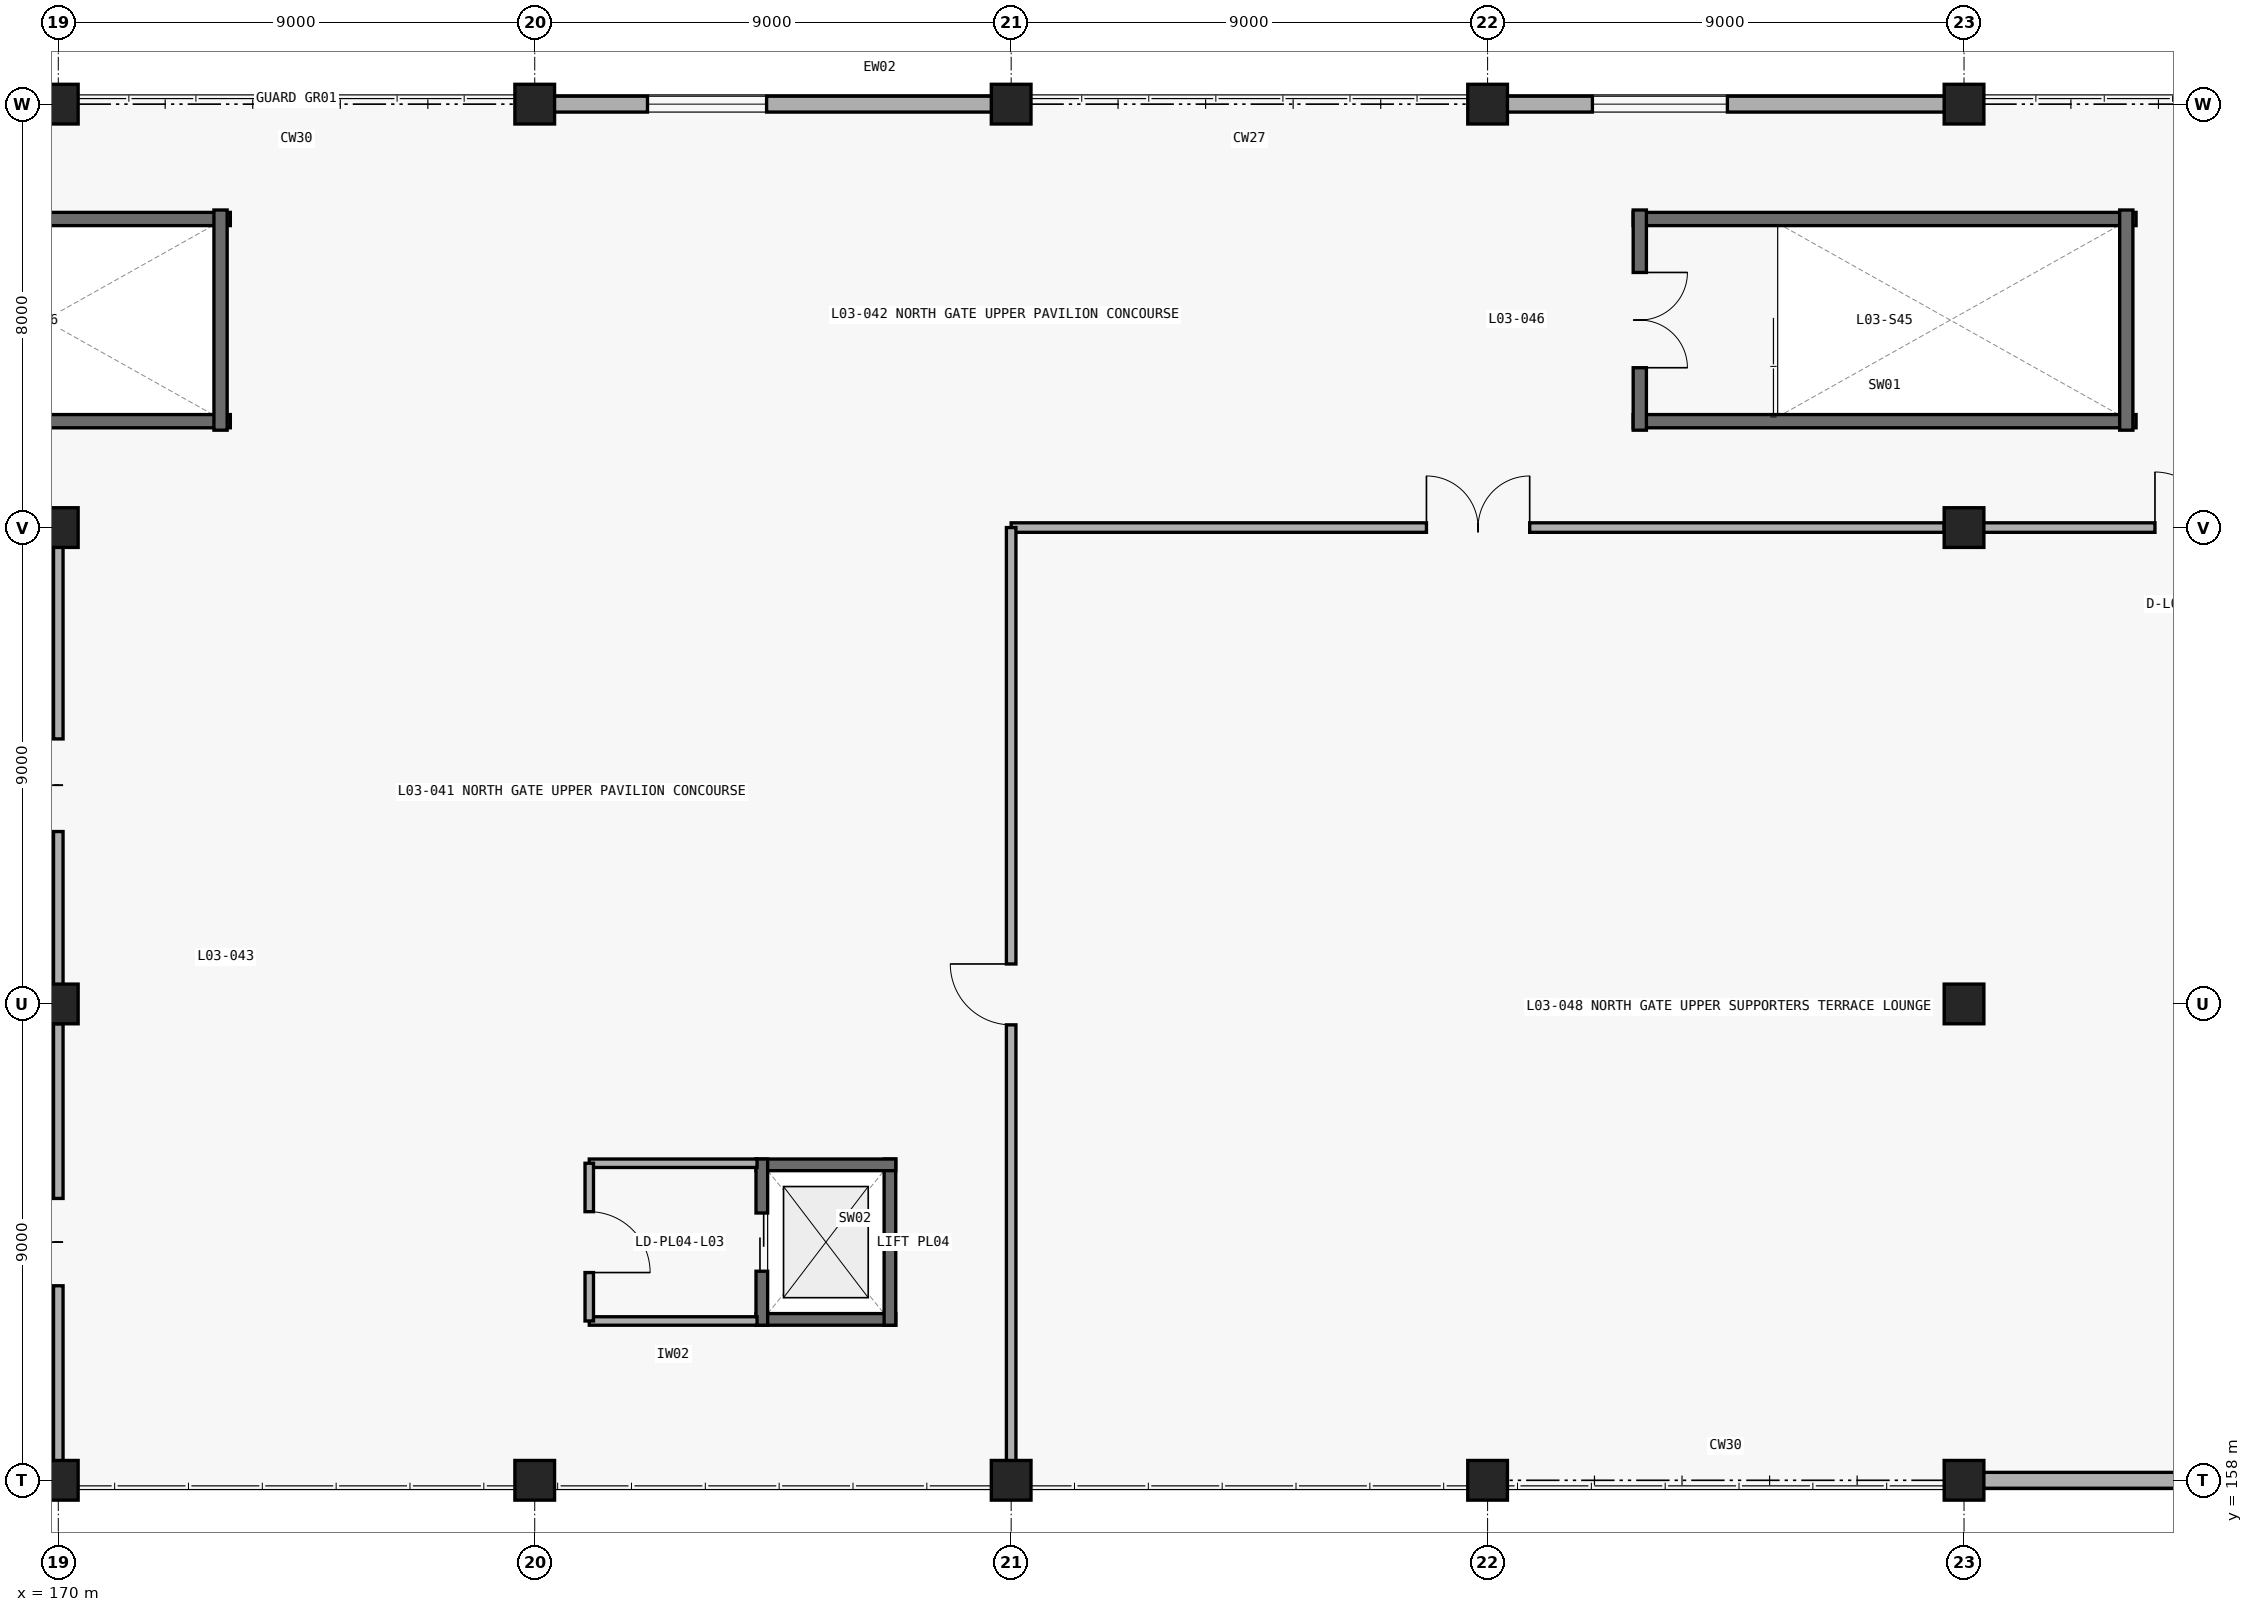
"""IFC4 building model, lengths in metres.
Left out: names, types, materials, properties, quantities, classifications, styles, units other than length and angle.
Written with IfcOpenShell. Run it as: python <this file> out.ifc"""

import sys

from ifc_helpers import new_model, si_unit, direction, frame, frame_2d, origin, origin_2d, place, context, subcontext, project, spatial, rectangle, extrude, element, fill, save


model = new_model("IFC4")
c1 = context("Model", 3, precision=1e-05, world=origin(), true_north=direction((0.0, 1.0)))
c2 = subcontext(c1, "Body", "Model", "MODEL_VIEW")
j1 = project(units=[si_unit("LENGTHUNIT", "METRE"), si_unit("PLANEANGLEUNIT", "RADIAN")], contexts=[c1])
p1 = place(None, origin())
s1 = spatial("IfcSite", under=j1, at=p1, CompositionType="ELEMENT")
p2 = place(p1, origin())
s2 = spatial("IfcBuilding", under=s1, at=p2, CompositionType="ELEMENT")
p3 = place(p2, frame((0.0, 0.0, 15.0)))
s3 = spatial("IfcBuildingStorey", under=s2, at=p3, CompositionType="ELEMENT", Elevation=15.0)
for number, where, z_axis, x_axis in (
    (1, (170.0, 158.0, 0.0), (0.0, 0.0, 1.0), (1.0, 0.0, 0.0)),
    (2, (170.0, 167.0, 0.0), (0.0, 0.0, 1.0), (1.0, 0.0, 0.0)),
    (3, (170.0, 176.0, 0.0), (0.0, 0.0, 1.0), (1.0, 0.0, 0.0)),
    (4, (170.0, 184.0, 0.0), (0.0, 0.0, 1.0), (1.0, 0.0, 0.0)),
    (5, (179.0, 158.0, 0.0), (0.0, 0.0, 1.0), (1.0, 0.0, 0.0)),
    (6, (179.0, 184.0, 0.0), (0.0, 0.0, 1.0), (1.0, 0.0, 0.0)),
    (7, (188.0, 158.0, 0.0), (0.0, 0.0, 1.0), (1.0, 0.0, 0.0)),
    (8, (188.0, 184.0, 0.0), (0.0, 0.0, 1.0), (1.0, 0.0, 0.0)),
    (9, (197.0, 158.0, 0.0), (0.0, 0.0, 1.0), (1.0, 0.0, 0.0)),
    (10, (197.0, 184.0, 0.0), (0.0, 0.0, 1.0), (1.0, 0.0, 0.0)),
    (11, (206.0, 158.0, 0.0), (0.0, 0.0, 1.0), (1.0, 0.0, 0.0)),
    (12, (206.0, 167.0, 0.0), (0.0, 0.0, 1.0), (1.0, 0.0, 0.0)),
    (13, (206.0, 176.0, 0.0), (0.0, 0.0, 1.0), (1.0, 0.0, 0.0)),
    (14, (206.0, 184.0, 0.0), (0.0, 0.0, 1.0), (1.0, 0.0, 0.0)),
):
    element("IfcColumn", number, at=place(p3, frame(where, z_axis=z_axis, x_axis=x_axis)), inside=s3, PredefinedType="COLUMN", context=c2, shape_type="SweptSolid", body=[
        extrude(rectangle(XDim=0.75, YDim=0.75, at=origin_2d()), origin(), (0.0, 0.0, 1.0), 4.8),
    ])
p4 = place(p3, frame((179.35, 184.0, 0.0), z_axis=(0.0, 0.0, 1.0), x_axis=(1.0, 0.0, 0.0)))
e15 = element("IfcWall", 15, at=p4, inside=s3, PredefinedType="STANDARD", context=c2, shape_type="SweptSolid", body=[
    extrude(rectangle(XDim=8.3, YDim=0.3, at=frame_2d((4.15, 0.0))), origin(), (0.0, 0.0, 1.0), 3.823),
])
p5 = place(p4, frame((1.78, 0.0, 0.95)))
e16 = element("IfcOpeningElement", 16, at=p5, cuts=e15, PredefinedType="OPENING", context=c2, shape_type="SweptSolid", body=[
    extrude(rectangle(XDim=2.25, YDim=2.15, at=frame_2d((1.125, 1.075))), frame((0.0, 0.16, 0.0), z_axis=(0.0, -1.0, 0.0), x_axis=(1.0, 0.0, 0.0)), (0.0, 0.0, 1.0), 0.32),
])
p6 = place(p3, frame((197.35, 184.0, 0.0), z_axis=(0.0, 0.0, 1.0), x_axis=(1.0, 0.0, 0.0)))
e17 = element("IfcWall", 17, at=p6, inside=s3, PredefinedType="STANDARD", context=c2, shape_type="SweptSolid", body=[
    extrude(rectangle(XDim=8.3, YDim=0.3, at=frame_2d((4.15, 0.0))), origin(), (0.0, 0.0, 1.0), 3.823),
])
p7 = place(p6, frame((1.63, 0.0, 0.95)))
e18 = element("IfcOpeningElement", 18, at=p7, cuts=e17, PredefinedType="OPENING", context=c2, shape_type="SweptSolid", body=[
    extrude(rectangle(XDim=2.55, YDim=2.2, at=frame_2d((1.275, 1.1))), frame((0.0, 0.16, 0.0), z_axis=(0.0, -1.0, 0.0), x_axis=(1.0, 0.0, 0.0)), (0.0, 0.0, 1.0), 0.32),
])
p8 = place(p3, frame((214.65, 158.0, 0.0), z_axis=(0.0, 0.0, 1.0), x_axis=(-1.0, 0.0, 0.0)))
e19 = element("IfcWall", 19, at=p8, inside=s3, PredefinedType="STANDARD", context=c2, shape_type="SweptSolid", body=[
    extrude(rectangle(XDim=8.3, YDim=0.3, at=frame_2d((4.15, 0.0))), origin(), (0.0, 0.0, 1.0), 3.823),
])
p9 = place(p8, frame((2.18, 0.0, 0.95)))
e20 = element("IfcOpeningElement", 20, at=p9, cuts=e19, PredefinedType="OPENING", context=c2, shape_type="SweptSolid", body=[
    extrude(rectangle(XDim=1.45, YDim=1.85, at=frame_2d((0.725, 0.925))), frame((0.0, 0.16, 0.0), z_axis=(0.0, -1.0, 0.0), x_axis=(1.0, 0.0, 0.0)), (0.0, 0.0, 1.0), 0.32),
])
for number, where, z_axis, x_axis in (
    (21, (199.75, 178.01, 0.0), (0.0, 0.0, 1.0), (1.0, 0.0, 0.0)),
    (22, (209.25, 181.83, 0.0), (0.0, 0.0, 1.0), (-1.0, 0.0, 0.0)),
):
    element("IfcWall", number, at=place(p3, frame(where, z_axis=z_axis, x_axis=x_axis)), inside=s3, PredefinedType="SHEAR", context=c2, shape_type="SweptSolid", body=[
        extrude(rectangle(XDim=9.5, YDim=0.25, at=frame_2d((4.75, 0.0))), origin(), (0.0, 0.0, 1.0), 4.54),
    ])
p10 = place(p3, frame((199.875, 182.0, 0.0), z_axis=(0.0, 0.0, 1.0), x_axis=(0.0, -1.0, 0.0)))
e23 = element("IfcWall", 23, at=p10, inside=s3, PredefinedType="SHEAR", context=c2, shape_type="SweptSolid", body=[
    extrude(rectangle(XDim=4.16, YDim=0.25, at=frame_2d((2.08, 0.0))), origin(), (0.0, 0.0, 1.0), 4.54),
])
p11 = place(p10, frame((1.18, 0.0, 0.0)))
e24 = element("IfcOpeningElement", 24, at=p11, cuts=e23, PredefinedType="OPENING", context=c2, shape_type="SweptSolid", body=[
    extrude(rectangle(XDim=1.8, YDim=2.25, at=frame_2d((0.9, 1.125))), frame((0.0, 0.135, 0.0), z_axis=(0.0, -1.0, 0.0), x_axis=(1.0, 0.0, 0.0)), (0.0, 0.0, 1.0), 0.27),
])
p12 = place(p3, frame((209.065, 177.84, 0.0), z_axis=(0.0, 0.0, 1.0), x_axis=(0.0, 1.0, 0.0)))
e25 = element("IfcWall", 25, at=p12, inside=s3, PredefinedType="SHEAR", context=c2, shape_type="SweptSolid", body=[
    extrude(rectangle(XDim=4.16, YDim=0.25, at=frame_2d((2.08, 0.0))), origin(), (0.0, 0.0, 1.0), 4.54),
])
for number, where, z_axis, x_axis in (
    (26, (163.75, 178.01, 0.0), (0.0, 0.0, 1.0), (1.0, 0.0, 0.0)),
    (27, (173.25, 181.83, 0.0), (0.0, 0.0, 1.0), (-1.0, 0.0, 0.0)),
):
    element("IfcWall", number, at=place(p3, frame(where, z_axis=z_axis, x_axis=x_axis)), inside=s3, PredefinedType="SHEAR", context=c2, shape_type="SweptSolid", body=[
        extrude(rectangle(XDim=9.5, YDim=0.25, at=frame_2d((4.75, 0.0))), origin(), (0.0, 0.0, 1.0), 4.54),
    ])
p13 = place(p3, frame((173.065, 177.84, 0.0), z_axis=(0.0, 0.0, 1.0), x_axis=(0.0, 1.0, 0.0)))
e28 = element("IfcWall", 28, at=p13, inside=s3, PredefinedType="SHEAR", context=c2, shape_type="SweptSolid", body=[
    extrude(rectangle(XDim=4.16, YDim=0.25, at=frame_2d((2.08, 0.0))), origin(), (0.0, 0.0, 1.0), 4.54),
])
p14 = place(p3, frame((183.18, 161.04, 0.0), z_axis=(0.0, 0.0, 1.0), x_axis=(1.0, 0.0, 0.0)))
e29 = element("IfcWall", 29, at=p14, inside=s3, PredefinedType="SHEAR", context=c2, shape_type="SweptSolid", body=[
    extrude(rectangle(XDim=2.64, YDim=0.22, at=frame_2d((1.32, 0.0))), origin(), (0.0, 0.0, 1.0), 4.54),
])
p15 = place(p3, frame((185.71, 160.93, 0.0), z_axis=(0.0, 0.0, 1.0), x_axis=(0.0, 1.0, 0.0)))
e30 = element("IfcWall", 30, at=p15, inside=s3, PredefinedType="SHEAR", context=c2, shape_type="SweptSolid", body=[
    extrude(rectangle(XDim=3.14, YDim=0.22, at=frame_2d((1.57, 0.0))), origin(), (0.0, 0.0, 1.0), 4.54),
])
p16 = place(p3, frame((185.82, 163.96, 0.0), z_axis=(0.0, 0.0, 1.0), x_axis=(-1.0, 0.0, 0.0)))
e31 = element("IfcWall", 31, at=p16, inside=s3, PredefinedType="SHEAR", context=c2, shape_type="SweptSolid", body=[
    extrude(rectangle(XDim=2.64, YDim=0.22, at=frame_2d((1.32, 0.0))), origin(), (0.0, 0.0, 1.0), 4.54),
])
p17 = place(p3, frame((183.29, 164.07, 0.0), z_axis=(0.0, 0.0, 1.0), x_axis=(0.0, -1.0, 0.0)))
e32 = element("IfcWall", 32, at=p17, inside=s3, PredefinedType="SHEAR", context=c2, shape_type="SweptSolid", body=[
    extrude(rectangle(XDim=3.14, YDim=0.22, at=frame_2d((1.57, 0.0))), origin(), (0.0, 0.0, 1.0), 4.54),
])
p18 = place(p17, frame((1.02, 0.0, 0.0)))
e33 = element("IfcOpeningElement", 33, at=p18, cuts=e32, PredefinedType="OPENING", context=c2, shape_type="SweptSolid", body=[
    extrude(rectangle(XDim=1.1, YDim=2.15, at=frame_2d((0.55, 1.075))), frame((0.0, 0.12, 0.0), z_axis=(0.0, -1.0, 0.0), x_axis=(1.0, 0.0, 0.0)), (0.0, 0.0, 1.0), 0.24),
])
for number, where, z_axis, x_axis in (
    (34, (183.2, 163.99, 0.0), (0.0, 0.0, 1.0), (-1.0, 0.0, 0.0)),
    (35, (183.2, 161.01, 0.0), (0.0, 0.0, 1.0), (-1.0, 0.0, 0.0)),
):
    element("IfcWall", number, at=place(p3, frame(where, z_axis=z_axis, x_axis=x_axis)), inside=s3, PredefinedType="PARTITIONING", context=c2, shape_type="SweptSolid", body=[
        extrude(rectangle(XDim=3.17, YDim=0.16, at=frame_2d((1.585, 0.0))), origin(), (0.0, 0.0, 1.0), 4.52),
    ])
p19 = place(p3, frame((180.03, 163.99, 0.0), z_axis=(0.0, 0.0, 1.0), x_axis=(0.0, -1.0, 0.0)))
e36 = element("IfcWall", 36, at=p19, inside=s3, PredefinedType="PARTITIONING", context=c2, shape_type="SweptSolid", body=[
    extrude(rectangle(XDim=2.98, YDim=0.16, at=frame_2d((1.49, 0.0))), origin(), (0.0, 0.0, 1.0), 4.52),
])
p20 = place(p19, frame((0.915, 0.0, 0.0)))
e37 = element("IfcOpeningElement", 37, at=p20, cuts=e36, PredefinedType="OPENING", context=c2, shape_type="SweptSolid", body=[
    extrude(rectangle(XDim=1.15, YDim=2.2, at=frame_2d((0.575, 1.1))), frame((0.0, 0.09, 0.0), z_axis=(0.0, -1.0, 0.0), x_axis=(1.0, 0.0, 0.0)), (0.0, 0.0, 1.0), 0.18),
])
p21 = place(p3, frame((170.0, 158.36, 0.0), z_axis=(0.0, 0.0, 1.0), x_axis=(0.0, 1.0, 0.0)))
e38 = element("IfcWall", 38, at=p21, inside=s3, PredefinedType="PARTITIONING", context=c2, shape_type="SweptSolid", body=[
    extrude(rectangle(XDim=8.28, YDim=0.18, at=frame_2d((4.14, 0.0))), origin(), (0.0, 0.0, 1.0), 3.857),
])
p22 = place(p21, frame((3.315, 0.0, 0.0)))
e39 = element("IfcOpeningElement", 39, at=p22, cuts=e38, PredefinedType="OPENING", context=c2, shape_type="SweptSolid", body=[
    extrude(rectangle(XDim=1.65, YDim=2.25, at=frame_2d((0.825, 1.125))), frame((0.0, 0.1, 0.0), z_axis=(0.0, -1.0, 0.0), x_axis=(1.0, 0.0, 0.0)), (0.0, 0.0, 1.0), 0.2),
])
p23 = place(p3, frame((170.0, 166.625, 0.0), z_axis=(0.0, 0.0, 1.0), x_axis=(0.0, 1.0, 0.0)))
e40 = element("IfcWall", 40, at=p23, inside=s3, PredefinedType="PARTITIONING", context=c2, shape_type="SweptSolid", body=[
    extrude(rectangle(XDim=9.015, YDim=0.18, at=frame_2d((4.507, 0.0))), origin(), (0.0, 0.0, 1.0), 3.857),
])
p24 = place(p23, frame((3.632, 0.0, 0.0)))
e41 = element("IfcOpeningElement", 41, at=p24, cuts=e40, PredefinedType="OPENING", context=c2, shape_type="SweptSolid", body=[
    extrude(rectangle(XDim=1.75, YDim=2.3, at=frame_2d((0.875, 1.15))), frame((0.0, 0.1, 0.0), z_axis=(0.0, -1.0, 0.0), x_axis=(1.0, 0.0, 0.0)), (0.0, 0.0, 1.0), 0.2),
])
p25 = place(p3, frame((188.0, 176.0, 0.0), z_axis=(0.0, 0.0, 1.0), x_axis=(1.0, 0.0, 0.0)))
e42 = element("IfcWall", 42, at=p25, inside=s3, PredefinedType="PARTITIONING", context=c2, shape_type="SweptSolid", body=[
    extrude(rectangle(XDim=17.64, YDim=0.18, at=frame_2d((8.82, 0.0))), origin(), (0.0, 0.0, 1.0), 4.52),
])
p26 = place(p25, frame((7.845, 0.0, 0.0)))
e43 = element("IfcOpeningElement", 43, at=p26, cuts=e42, PredefinedType="OPENING", context=c2, shape_type="SweptSolid", body=[
    extrude(rectangle(XDim=1.95, YDim=2.35, at=frame_2d((0.975, 1.175))), frame((0.0, 0.1, 0.0), z_axis=(0.0, -1.0, 0.0), x_axis=(1.0, 0.0, 0.0)), (0.0, 0.0, 1.0), 0.2),
])
p27 = place(p3, frame((205.625, 176.0, 0.0), z_axis=(0.0, 0.0, 1.0), x_axis=(1.0, 0.0, 0.0)))
e44 = element("IfcWall", 44, at=p27, inside=s3, PredefinedType="PARTITIONING", context=c2, shape_type="SweptSolid", body=[
    extrude(rectangle(XDim=9.015, YDim=0.18, at=frame_2d((4.507, 0.0))), origin(), (0.0, 0.0, 1.0), 3.823),
])
p28 = place(p27, frame((3.982, 0.0, 0.0)))
e45 = element("IfcOpeningElement", 45, at=p28, cuts=e44, PredefinedType="OPENING", context=c2, shape_type="SweptSolid", body=[
    extrude(rectangle(XDim=1.05, YDim=2.15, at=frame_2d((0.525, 1.075))), frame((0.0, 0.1, 0.0), z_axis=(0.0, -1.0, 0.0), x_axis=(1.0, 0.0, 0.0)), (0.0, 0.0, 1.0), 0.2),
])
p29 = place(p3, frame((188.0, 158.36, 0.0), z_axis=(0.0, 0.0, 1.0), x_axis=(0.0, 1.0, 0.0)))
e46 = element("IfcWall", 46, at=p29, inside=s3, PredefinedType="PARTITIONING", context=c2, shape_type="SweptSolid", body=[
    extrude(rectangle(XDim=17.64, YDim=0.18, at=frame_2d((8.82, 0.0))), origin(), (0.0, 0.0, 1.0), 4.52),
])
p30 = place(p29, frame((8.245, 0.0, 0.0)))
e47 = element("IfcOpeningElement", 47, at=p30, cuts=e46, PredefinedType="OPENING", context=c2, shape_type="SweptSolid", body=[
    extrude(rectangle(XDim=1.15, YDim=2.2, at=frame_2d((0.575, 1.1))), frame((0.0, 0.1, 0.0), z_axis=(0.0, -1.0, 0.0), x_axis=(1.0, 0.0, 0.0)), (0.0, 0.0, 1.0), 0.2),
])
p31 = place(p5, origin())
e48 = element("IfcWindow", 48, at=p31, inside=s3, PartitioningType="SINGLE_PANEL", PredefinedType="WINDOW", context=c2, shape_type="SweptSolid", body=[
    extrude(rectangle(XDim=2.25, YDim=2.15, at=frame_2d((1.125, 1.075))), frame((0.0, 0.03, 0.0), z_axis=(0.0, -1.0, 0.0), x_axis=(1.0, 0.0, 0.0)), (0.0, 0.0, 1.0), 0.06),
])
fill(e16, e48)
p32 = place(p7, origin())
e49 = element("IfcWindow", 49, at=p32, inside=s3, PartitioningType="SINGLE_PANEL", PredefinedType="WINDOW", context=c2, shape_type="SweptSolid", body=[
    extrude(rectangle(XDim=2.55, YDim=2.2, at=frame_2d((1.275, 1.1))), frame((0.0, 0.03, 0.0), z_axis=(0.0, -1.0, 0.0), x_axis=(1.0, 0.0, 0.0)), (0.0, 0.0, 1.0), 0.06),
])
fill(e18, e49)
p33 = place(p11, origin())
e50 = element("IfcDoor", 50, at=p33, inside=s3, OperationType="DOUBLE_DOOR_SINGLE_SWING", PredefinedType="DOOR", context=c2, shape_type="SweptSolid", body=[
    extrude(rectangle(XDim=1.8, YDim=2.25, at=frame_2d((0.9, 1.125))), frame((0.0, 0.025, 0.0), z_axis=(0.0, -1.0, 0.0), x_axis=(1.0, 0.0, 0.0)), (0.0, 0.0, 1.0), 0.05),
])
fill(e24, e50)
p34 = place(p18, origin())
e51 = element("IfcDoor", 51, at=p34, inside=s3, OperationType="SLIDING_TO_LEFT", PredefinedType="DOOR", context=c2, shape_type="SweptSolid", body=[
    extrude(rectangle(XDim=1.1, YDim=2.15, at=frame_2d((0.55, 1.075))), frame((0.0, 0.025, 0.0), z_axis=(0.0, -1.0, 0.0), x_axis=(1.0, 0.0, 0.0)), (0.0, 0.0, 1.0), 0.05),
])
fill(e33, e51)
p35 = place(p20, origin())
e52 = element("IfcDoor", 52, at=p35, inside=s3, OperationType="SINGLE_SWING_RIGHT", PredefinedType="DOOR", context=c2, shape_type="SweptSolid", body=[
    extrude(rectangle(XDim=1.15, YDim=2.2, at=frame_2d((0.575, 1.1))), frame((0.0, 0.025, 0.0), z_axis=(0.0, -1.0, 0.0), x_axis=(1.0, 0.0, 0.0)), (0.0, 0.0, 1.0), 0.05),
])
fill(e37, e52)
p36 = place(p22, origin())
e53 = element("IfcDoor", 53, at=p36, inside=s3, OperationType="DOUBLE_DOOR_SINGLE_SWING", PredefinedType="DOOR", context=c2, shape_type="SweptSolid", body=[
    extrude(rectangle(XDim=1.65, YDim=2.25, at=frame_2d((0.825, 1.125))), frame((0.0, 0.025, 0.0), z_axis=(0.0, -1.0, 0.0), x_axis=(1.0, 0.0, 0.0)), (0.0, 0.0, 1.0), 0.05),
])
fill(e39, e53)
p37 = place(p24, origin())
e54 = element("IfcDoor", 54, at=p37, inside=s3, OperationType="DOUBLE_DOOR_SINGLE_SWING", PredefinedType="DOOR", context=c2, shape_type="SweptSolid", body=[
    extrude(rectangle(XDim=1.75, YDim=2.3, at=frame_2d((0.875, 1.15))), frame((0.0, 0.025, 0.0), z_axis=(0.0, -1.0, 0.0), x_axis=(1.0, 0.0, 0.0)), (0.0, 0.0, 1.0), 0.05),
])
fill(e41, e54)
p38 = place(p26, origin())
e55 = element("IfcDoor", 55, at=p38, inside=s3, OperationType="DOUBLE_DOOR_SINGLE_SWING", PredefinedType="DOOR", context=c2, shape_type="SweptSolid", body=[
    extrude(rectangle(XDim=1.95, YDim=2.35, at=frame_2d((0.975, 1.175))), frame((0.0, 0.025, 0.0), z_axis=(0.0, -1.0, 0.0), x_axis=(1.0, 0.0, 0.0)), (0.0, 0.0, 1.0), 0.05),
])
fill(e43, e55)
p39 = place(p28, origin())
e56 = element("IfcDoor", 56, at=p39, inside=s3, OperationType="SINGLE_SWING_LEFT", PredefinedType="DOOR", context=c2, shape_type="SweptSolid", body=[
    extrude(rectangle(XDim=1.05, YDim=2.15, at=frame_2d((0.525, 1.075))), frame((0.0, 0.025, 0.0), z_axis=(0.0, -1.0, 0.0), x_axis=(1.0, 0.0, 0.0)), (0.0, 0.0, 1.0), 0.05),
])
fill(e45, e56)
p40 = place(p30, origin())
e57 = element("IfcDoor", 57, at=p40, inside=s3, OperationType="SINGLE_SWING_RIGHT", PredefinedType="DOOR", context=c2, shape_type="SweptSolid", body=[
    extrude(rectangle(XDim=1.15, YDim=2.2, at=frame_2d((0.575, 1.1))), frame((0.0, 0.025, 0.0), z_axis=(0.0, -1.0, 0.0), x_axis=(1.0, 0.0, 0.0)), (0.0, 0.0, 1.0), 0.05),
])
fill(e47, e57)
save(model, sys.argv[1])
